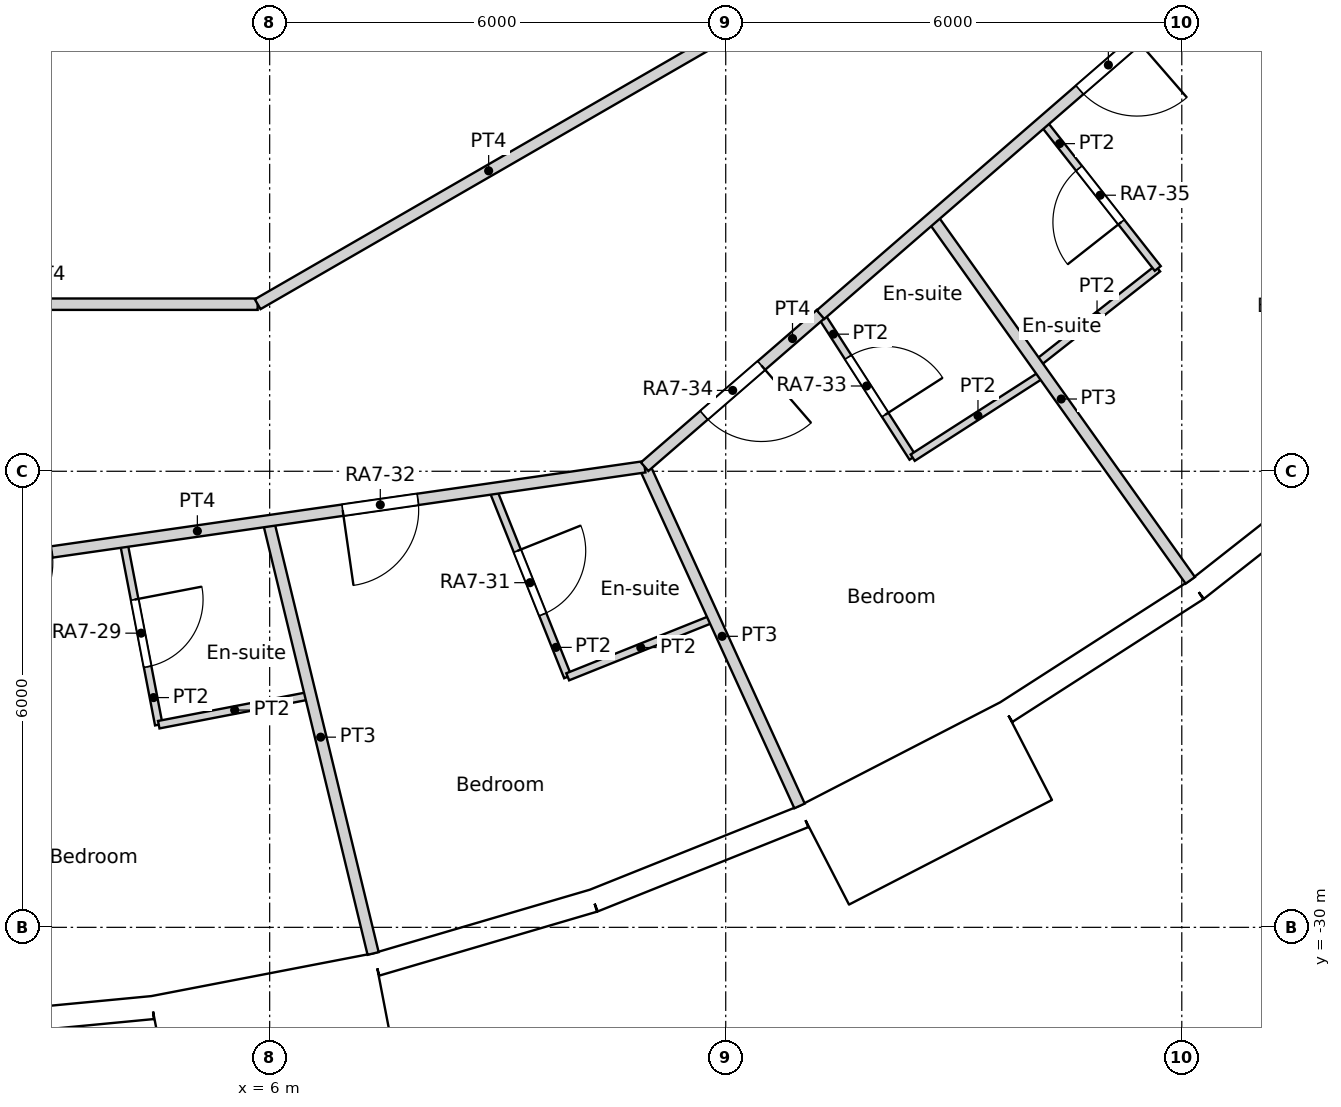
"""IFC4 building model, lengths in metres.
Left out: names, types, materials, properties, quantities, classifications, styles, units other than length and angle.
Written with IfcOpenShell. Run it as: python <this file> out.ifc"""

import sys

from ifc_helpers import new_model, si_unit, direction, frame, frame_2d, origin, origin_2d, place, context, subcontext, project, spatial, rectangle, circle, extrude, element, fill, save


model = new_model("IFC4")
c1 = context("Model", 3, precision=1e-05, world=origin(), true_north=direction((0.0, 1.0)))
c2 = subcontext(c1, "Body", "Model", "MODEL_VIEW")
j1 = project(units=[si_unit("LENGTHUNIT", "METRE"), si_unit("PLANEANGLEUNIT", "RADIAN")], contexts=[c1])
p1 = place(None, origin())
s1 = spatial("IfcSite", under=j1, at=p1, CompositionType="ELEMENT")
p2 = place(p1, origin())
s2 = spatial("IfcBuilding", under=s1, at=p2, CompositionType="ELEMENT")
p3 = place(p2, frame((0.0, 0.0, 93.0)))
s3 = spatial("IfcBuildingStorey", under=s2, at=p3, CompositionType="ELEMENT", Elevation=93.0)
for number, where, z_axis, x_axis in (
    (1, (7.137, -29.421, 0.0), (0.0, 0.0, 1.0), (1.0, 0.0, 0.0)),
    (2, (12.576, -27.539, 0.0), (0.0, 0.0, 1.0), (1.0, 0.0, 0.0)),
    (3, (17.561, -24.661, 0.0), (0.0, 0.0, 1.0), (1.0, 0.0, 0.0)),
):
    element("IfcColumn", number, at=place(p3, frame(where, z_axis=z_axis, x_axis=x_axis)), inside=s3, PredefinedType="COLUMN", context=c2, shape_type="SweptSolid", body=[
        extrude(circle(Radius=0.6, at=origin_2d()), origin(), (0.0, 0.0, 1.0), 3.6),
    ])
for number, where, z_axis, x_axis in (
    (4, (4.263, -24.175, 0.0), (0.0, 0.0, 1.0), (1.0, 0.0, 0.0)),
    (5, (9.723, -22.54, 0.0), (0.0, 0.0, 1.0), (1.0, 0.0, 0.0)),
    (6, (14.659, -19.69, 0.0), (0.0, 0.0, 1.0), (1.0, 0.0, 0.0)),
):
    element("IfcColumn", number, at=place(p3, frame(where, z_axis=z_axis, x_axis=x_axis)), inside=s3, PredefinedType="COLUMN", context=c2, shape_type="SweptSolid", body=[
        extrude(circle(Radius=0.65, at=origin_2d()), origin(), (0.0, 0.0, 1.0), 3.6),
    ])
p4 = place(p3, frame((1.493, -31.339, 0.0), z_axis=(0.0, 0.0, 1.0), x_axis=(0.995472611385, 0.095048829468, 0.0)))
e7 = element("IfcWall", 7, at=p4, inside=s3, PredefinedType="SOLIDWALL", context=c2, shape_type="SweptSolid", body=[
    extrude(rectangle(XDim=2.979, YDim=0.3, at=frame_2d((1.49, 0.0))), origin(), (0.0, 0.0, 1.0), 3.15),
])
p5 = place(p4, frame((1.49, 0.0, 1.55)))
e8 = element("IfcOpeningElement", 8, at=p5, cuts=e7, PredefinedType="OPENING", context=c2, shape_type="SweptSolid", body=[
    extrude(circle(Radius=0.9, at=origin_2d()), frame((0.0, 0.16, 0.0), z_axis=(0.0, -1.0, 0.0), x_axis=(1.0, 0.0, 0.0)), (0.0, 0.0, 1.0), 0.32),
])
p6 = place(p3, frame((4.567, -31.621, -0.45), z_axis=(0.0, 0.0, 1.0), x_axis=(0.981921602273, 0.189288052949, 0.0)))
e9 = element("IfcWall", 9, at=p6, inside=s3, PredefinedType="ELEMENTEDWALL", context=c2, shape_type="SweptSolid", body=[
    extrude(rectangle(XDim=3.0, YDim=1.45, at=frame_2d((1.5, 0.0))), origin(), (0.0, 0.0, 1.0), 3.6),
])
p7 = place(p6, frame((1.5, 0.0, 2.0)))
e10 = element("IfcOpeningElement", 10, at=p7, cuts=e9, PredefinedType="OPENING", context=c2, shape_type="SweptSolid", body=[
    extrude(circle(Radius=0.9, at=origin_2d()), frame((0.0, 0.735, 0.0), z_axis=(0.0, -1.0, 0.0), x_axis=(1.0, 0.0, 0.0)), (0.0, 0.0, 1.0), 1.47),
])
p8 = place(p3, frame((7.403, -30.488, 0.0), z_axis=(0.0, 0.0, 1.0), x_axis=(0.959501085144, 0.281704930036, 0.0)))
e11 = element("IfcWall", 11, at=p8, inside=s3, PredefinedType="SOLIDWALL", context=c2, shape_type="SweptSolid", body=[
    extrude(rectangle(XDim=2.979, YDim=0.3, at=frame_2d((1.49, 0.0))), origin(), (0.0, 0.0, 1.0), 3.15),
])
p9 = place(p8, frame((1.49, 0.0, 1.55)))
e12 = element("IfcOpeningElement", 12, at=p9, cuts=e11, PredefinedType="OPENING", context=c2, shape_type="SweptSolid", body=[
    extrude(circle(Radius=0.9, at=origin_2d()), frame((0.0, 0.16, 0.0), z_axis=(0.0, -1.0, 0.0), x_axis=(1.0, 0.0, 0.0)), (0.0, 0.0, 1.0), 0.32),
])
p10 = place(p3, frame((10.261, -29.649, 0.0), z_axis=(0.0, 0.0, 1.0), x_axis=(0.928374947, 0.371644935098, 0.0)))
e13 = element("IfcWall", 13, at=p10, inside=s3, PredefinedType="SOLIDWALL", context=c2, shape_type="SweptSolid", body=[
    extrude(rectangle(XDim=2.98, YDim=0.3, at=frame_2d((1.49, 0.0))), origin(), (0.0, 0.0, 1.0), 3.15),
])
p11 = place(p10, frame((1.49, 0.0, 1.55)))
e14 = element("IfcOpeningElement", 14, at=p11, cuts=e13, PredefinedType="OPENING", context=c2, shape_type="SweptSolid", body=[
    extrude(circle(Radius=0.9, at=origin_2d()), frame((0.0, 0.16, 0.0), z_axis=(0.0, -1.0, 0.0), x_axis=(1.0, 0.0, 0.0)), (0.0, 0.0, 1.0), 0.32),
])
p12 = place(p3, frame((13.291, -29.053, -0.45), z_axis=(0.0, 0.0, 1.0), x_axis=(0.888858064689, 0.458182650083, 0.0)))
e15 = element("IfcWall", 15, at=p12, inside=s3, PredefinedType="ELEMENTEDWALL", context=c2, shape_type="SweptSolid", body=[
    extrude(rectangle(XDim=3.0, YDim=1.45, at=frame_2d((1.5, 0.0))), origin(), (0.0, 0.0, 1.0), 3.6),
])
p13 = place(p12, frame((1.5, 0.0, 2.0)))
e16 = element("IfcOpeningElement", 16, at=p13, cuts=e15, PredefinedType="OPENING", context=c2, shape_type="SweptSolid", body=[
    extrude(circle(Radius=0.9, at=origin_2d()), frame((0.0, 0.735, 0.0), z_axis=(0.0, -1.0, 0.0), x_axis=(1.0, 0.0, 0.0)), (0.0, 0.0, 1.0), 1.47),
])
p14 = place(p3, frame((15.692, -27.168, 0.0), z_axis=(0.0, 0.0, 1.0), x_axis=(0.841260995538, 0.54062920508, 0.0)))
e17 = element("IfcWall", 17, at=p14, inside=s3, PredefinedType="SOLIDWALL", context=c2, shape_type="SweptSolid", body=[
    extrude(rectangle(XDim=2.979, YDim=0.3, at=frame_2d((1.49, 0.0))), origin(), (0.0, 0.0, 1.0), 3.15),
])
p15 = place(p14, frame((1.49, 0.0, 1.55)))
e18 = element("IfcOpeningElement", 18, at=p15, cuts=e17, PredefinedType="OPENING", context=c2, shape_type="SweptSolid", body=[
    extrude(circle(Radius=0.9, at=origin_2d()), frame((0.0, 0.16, 0.0), z_axis=(0.0, -1.0, 0.0), x_axis=(1.0, 0.0, 0.0)), (0.0, 0.0, 1.0), 0.32),
])
p16 = place(p3, frame((18.199, -25.557, 0.0), z_axis=(0.0, 0.0, 1.0), x_axis=(0.786053834673, 0.618158045322, 0.0)))
e19 = element("IfcWall", 19, at=p16, inside=s3, PredefinedType="SOLIDWALL", context=c2, shape_type="SweptSolid", body=[
    extrude(rectangle(XDim=2.979, YDim=0.3, at=frame_2d((1.49, 0.0))), origin(), (0.0, 0.0, 1.0), 3.15),
])
p17 = place(p16, frame((1.49, 0.0, 1.55)))
e20 = element("IfcOpeningElement", 20, at=p17, cuts=e19, PredefinedType="OPENING", context=c2, shape_type="SweptSolid", body=[
    extrude(circle(Radius=0.9, at=origin_2d()), frame((0.0, 0.16, 0.0), z_axis=(0.0, -1.0, 0.0), x_axis=(1.0, 0.0, 0.0)), (0.0, 0.0, 1.0), 0.32),
])
p18 = place(p3, frame((13.247, -21.939, 0.0), z_axis=(0.0, 0.0, 1.0), x_axis=(0.755420750547, 0.655240024451, 0.0)))
e21 = element("IfcWall", 21, at=p18, inside=s3, PredefinedType="PARTITIONING", context=c2, shape_type="SweptSolid", body=[
    extrude(rectangle(XDim=11.771, YDim=0.15, at=frame_2d((5.885, 0.0))), origin(), (0.0, 0.0, 1.0), 3.15),
])
p19 = place(p18, frame((4.513, 0.0, 0.0)))
e22 = element("IfcOpeningElement", 22, at=p19, cuts=e21, PredefinedType="OPENING", context=c2, shape_type="SweptSolid", body=[
    extrude(rectangle(XDim=1.0, YDim=2.1, at=frame_2d((0.5, 1.05))), frame((0.0, 0.075, 0.0), z_axis=(0.0, -1.0, 0.0), x_axis=(1.0, 0.0, 0.0)), (0.0, 0.0, 1.0), 0.15),
])
p20 = place(p3, frame((0.31, -21.802, 0.0), z_axis=(0.0, 0.0, 1.0), x_axis=(1.0, 0.0, 0.0)))
e23 = element("IfcWall", 23, at=p20, inside=s3, PredefinedType="PARTITIONING", context=c2, shape_type="SweptSolid", body=[
    extrude(rectangle(XDim=5.532, YDim=0.15, at=frame_2d((2.766, 0.0))), origin(), (0.0, 0.0, 1.0), 3.15),
])
p21 = place(p3, frame((5.842, -21.802, 0.0), z_axis=(0.0, 0.0, 1.0), x_axis=(0.866027436592, 0.499996479058, 0.0)))
e24 = element("IfcWall", 24, at=p21, inside=s3, PredefinedType="PARTITIONING", context=c2, shape_type="SweptSolid", body=[
    extrude(rectangle(XDim=7.018, YDim=0.15, at=frame_2d((3.509, 0.0))), origin(), (0.0, 0.0, 1.0), 3.15),
])
p22 = place(p3, frame((-3.746, -26.05, 0.0), z_axis=(0.0, 0.0, 1.0), x_axis=(0.98983491963, 0.142221066938, 0.0)))
e25 = element("IfcWall", 25, at=p22, inside=s3, PredefinedType="PARTITIONING", context=c2, shape_type="SweptSolid", body=[
    extrude(rectangle(XDim=14.83, YDim=0.15, at=frame_2d((7.415, 0.0))), origin(), (0.0, 0.0, 1.0), 3.15),
])
p23 = place(p22, frame((3.214, 0.0, 0.0)))
e26 = element("IfcOpeningElement", 26, at=p23, cuts=e25, PredefinedType="OPENING", context=c2, shape_type="SweptSolid", body=[
    extrude(rectangle(XDim=1.0, YDim=2.1, at=frame_2d((0.5, 1.05))), frame((0.0, 0.075, 0.0), z_axis=(0.0, -1.0, 0.0), x_axis=(1.0, 0.0, 0.0)), (0.0, 0.0, 1.0), 0.15),
])
p24 = place(p22, frame((5.954, 0.0, 0.0)))
e27 = element("IfcOpeningElement", 27, at=p24, cuts=e25, PredefinedType="OPENING", context=c2, shape_type="SweptSolid", body=[
    extrude(rectangle(XDim=1.0, YDim=2.1, at=frame_2d((0.5, 1.05))), frame((0.0, 0.075, 0.0), z_axis=(0.0, -1.0, 0.0), x_axis=(1.0, 0.0, 0.0)), (0.0, 0.0, 1.0), 0.15),
])
p25 = place(p22, frame((10.816, 0.0, 0.0)))
e28 = element("IfcOpeningElement", 28, at=p25, cuts=e25, PredefinedType="OPENING", context=c2, shape_type="SweptSolid", body=[
    extrude(rectangle(XDim=1.0, YDim=2.1, at=frame_2d((0.5, 1.05))), frame((0.0, 0.075, 0.0), z_axis=(0.0, -1.0, 0.0), x_axis=(1.0, 0.0, 0.0)), (0.0, 0.0, 1.0), 0.15),
])
p26 = place(p3, frame((10.933, -23.94, 0.0), z_axis=(0.0, 0.0, 1.0), x_axis=(0.755675945931, 0.654945696025, 0.0)))
e29 = element("IfcWall", 29, at=p26, inside=s3, PredefinedType="PARTITIONING", context=c2, shape_type="SweptSolid", body=[
    extrude(rectangle(XDim=3.066, YDim=0.15, at=frame_2d((1.533, 0.0))), origin(), (0.0, 0.0, 1.0), 3.15),
])
p27 = place(p26, frame((1.033, 0.0, 0.0)))
e30 = element("IfcOpeningElement", 30, at=p27, cuts=e29, PredefinedType="OPENING", context=c2, shape_type="SweptSolid", body=[
    extrude(rectangle(XDim=1.0, YDim=2.1, at=frame_2d((0.5, 1.05))), frame((0.0, 0.075, 0.0), z_axis=(0.0, -1.0, 0.0), x_axis=(1.0, 0.0, 0.0)), (0.0, 0.0, 1.0), 0.15),
])
p28 = place(p3, frame((4.077, -24.926, 0.0), z_axis=(0.0, 0.0, 1.0), x_axis=(0.18925724964, -0.981927539821, 0.0)))
e31 = element("IfcWall", 31, at=p28, inside=s3, PredefinedType="PARTITIONING", context=c2, shape_type="SweptSolid", body=[
    extrude(rectangle(XDim=2.452, YDim=0.1, at=frame_2d((1.226, 0.0))), origin(), (0.0, 0.0, 1.0), 3.15),
])
p29 = place(p28, frame((0.776, 0.0, 0.0)))
e32 = element("IfcOpeningElement", 32, at=p29, cuts=e31, PredefinedType="OPENING", context=c2, shape_type="SweptSolid", body=[
    extrude(rectangle(XDim=0.9, YDim=2.04, at=frame_2d((0.45, 1.02))), frame((0.0, 0.05, 0.0), z_axis=(0.0, -1.0, 0.0), x_axis=(1.0, 0.0, 0.0)), (0.0, 0.0, 1.0), 0.1),
])
p30 = place(p3, frame((4.541, -27.334, 0.0), z_axis=(0.0, 0.0, 1.0), x_axis=(0.981919009751, 0.189301501024, 0.0)))
e33 = element("IfcWall", 33, at=p30, inside=s3, PredefinedType="PARTITIONING", context=c2, shape_type="SweptSolid", body=[
    extrude(rectangle(XDim=2.034, YDim=0.1, at=frame_2d((1.017, 0.0))), origin(), (0.0, 0.0, 1.0), 3.15),
])
p31 = place(p3, frame((5.981, -24.652, 0.0), z_axis=(0.0, 0.0, 1.0), x_axis=(0.235604797906, -0.971848948759, 0.0)))
e34 = element("IfcWall", 34, at=p31, inside=s3, PredefinedType="PARTITIONING", context=c2, shape_type="SweptSolid", body=[
    extrude(rectangle(XDim=5.857, YDim=0.15, at=frame_2d((2.928, 0.0))), origin(), (0.0, 0.0, 1.0), 3.15),
])
p32 = place(p3, frame((8.93, -24.228, 0.0), z_axis=(0.0, 0.0, 1.0), x_axis=(0.371564281805, -0.928407229876, 0.0)))
e35 = element("IfcWall", 35, at=p32, inside=s3, PredefinedType="PARTITIONING", context=c2, shape_type="SweptSolid", body=[
    extrude(rectangle(XDim=2.667, YDim=0.1, at=frame_2d((1.333, 0.0))), origin(), (0.0, 0.0, 1.0), 3.15),
])
p33 = place(p32, frame((0.883, 0.0, 0.0)))
e36 = element("IfcOpeningElement", 36, at=p33, cuts=e35, PredefinedType="OPENING", context=c2, shape_type="SweptSolid", body=[
    extrude(rectangle(XDim=0.9, YDim=2.04, at=frame_2d((0.45, 1.02))), frame((0.0, 0.05, 0.0), z_axis=(0.0, -1.0, 0.0), x_axis=(1.0, 0.0, 0.0)), (0.0, 0.0, 1.0), 0.1),
])
p34 = place(p3, frame((9.921, -26.704, 0.0), z_axis=(0.0, 0.0, 1.0), x_axis=(0.928346586681, 0.37171577179, 0.0)))
e37 = element("IfcWall", 37, at=p34, inside=s3, PredefinedType="PARTITIONING", context=c2, shape_type="SweptSolid", body=[
    extrude(rectangle(XDim=2.072, YDim=0.1, at=frame_2d((1.036, 0.0))), origin(), (0.0, 0.0, 1.0), 3.15),
])
p35 = place(p3, frame((10.934, -23.94, 0.0), z_axis=(0.0, 0.0, 1.0), x_axis=(0.415245800153, -0.909709253254, 0.0)))
e38 = element("IfcWall", 38, at=p35, inside=s3, PredefinedType="PARTITIONING", context=c2, shape_type="SweptSolid", body=[
    extrude(rectangle(XDim=4.906, YDim=0.15, at=frame_2d((2.453, 0.0))), origin(), (0.0, 0.0, 1.0), 3.15),
])
p36 = place(p3, frame((13.248, -21.935, 0.0), z_axis=(0.0, 0.0, 1.0), x_axis=(0.540597960994, -0.841281073464, 0.0)))
e39 = element("IfcWall", 39, at=p36, inside=s3, PredefinedType="PARTITIONING", context=c2, shape_type="SweptSolid", body=[
    extrude(rectangle(XDim=2.242, YDim=0.1, at=frame_2d((1.121, 0.0))), origin(), (0.0, 0.0, 1.0), 3.15),
])
p37 = place(p36, frame((0.671, 0.0, 0.0)))
e40 = element("IfcOpeningElement", 40, at=p37, cuts=e39, PredefinedType="OPENING", context=c2, shape_type="SweptSolid", body=[
    extrude(rectangle(XDim=0.9, YDim=2.04, at=frame_2d((0.45, 1.02))), frame((0.0, 0.05, 0.0), z_axis=(0.0, -1.0, 0.0), x_axis=(1.0, 0.0, 0.0)), (0.0, 0.0, 1.0), 0.1),
])
p38 = place(p3, frame((14.46, -23.821, 0.0), z_axis=(0.0, 0.0, 1.0), x_axis=(0.841135728185, 0.540824081168, 0.0)))
e41 = element("IfcWall", 41, at=p38, inside=s3, PredefinedType="PARTITIONING", context=c2, shape_type="SweptSolid", body=[
    extrude(rectangle(XDim=2.041, YDim=0.1, at=frame_2d((1.021, 0.0))), origin(), (0.0, 0.0, 1.0), 3.15),
])
p39 = place(p3, frame((14.715, -20.664, 0.0), z_axis=(0.0, 0.0, 1.0), x_axis=(0.57995989616, -0.814645026282, 0.0)))
e42 = element("IfcWall", 42, at=p39, inside=s3, PredefinedType="PARTITIONING", context=c2, shape_type="SweptSolid", body=[
    extrude(rectangle(XDim=5.857, YDim=0.15, at=frame_2d((2.928, 0.0))), origin(), (0.0, 0.0, 1.0), 3.15),
])
p40 = place(p3, frame((16.086, -22.589, 0.0), z_axis=(0.0, 0.0, 1.0), x_axis=(0.785984904201, 0.618245687707, 0.0)))
e43 = element("IfcWall", 43, at=p40, inside=s3, PredefinedType="PARTITIONING", context=c2, shape_type="SweptSolid", body=[
    extrude(rectangle(XDim=2.033, YDim=0.1, at=frame_2d((1.017, 0.0))), origin(), (0.0, 0.0, 1.0), 3.15),
])
p41 = place(p3, frame((16.168, -19.404, 0.0), z_axis=(0.0, 0.0, 1.0), x_axis=(0.618142414415, -0.786066126672, 0.0)))
e44 = element("IfcWall", 44, at=p41, inside=s3, PredefinedType="PARTITIONING", context=c2, shape_type="SweptSolid", body=[
    extrude(rectangle(XDim=2.453, YDim=0.1, at=frame_2d((1.226, 0.0))), origin(), (0.0, 0.0, 1.0), 3.15),
])
p42 = place(p41, frame((0.777, 0.0, 0.0)))
e45 = element("IfcOpeningElement", 45, at=p42, cuts=e44, PredefinedType="OPENING", context=c2, shape_type="SweptSolid", body=[
    extrude(rectangle(XDim=0.9, YDim=2.04, at=frame_2d((0.45, 1.02))), frame((0.0, 0.05, 0.0), z_axis=(0.0, -1.0, 0.0), x_axis=(1.0, 0.0, 0.0)), (0.0, 0.0, 1.0), 0.1),
])
p43 = place(p3, frame((18.359, -17.506, 0.0), z_axis=(0.0, 0.0, 1.0), x_axis=(0.723808715798, -0.690000683286, 0.0)))
e46 = element("IfcWall", 46, at=p43, inside=s3, PredefinedType="PARTITIONING", context=c2, shape_type="SweptSolid", body=[
    extrude(rectangle(XDim=5.856, YDim=0.15, at=frame_2d((2.928, 0.0))), origin(), (0.0, 0.0, 1.0), 3.15),
])
p44 = place(p5, origin())
e47 = element("IfcWindow", 47, at=p44, inside=s3, PartitioningType="SINGLE_PANEL", PredefinedType="WINDOW", context=c2, shape_type="SweptSolid", body=[
    extrude(circle(Radius=0.9, at=origin_2d()), frame((0.0, 0.12, 0.0), z_axis=(0.0, -1.0, 0.0), x_axis=(1.0, 0.0, 0.0)), (0.0, 0.0, 1.0), 0.1),
])
fill(e8, e47)
p45 = place(p7, origin())
e48 = element("IfcWindow", 48, at=p45, inside=s3, PartitioningType="SINGLE_PANEL", PredefinedType="WINDOW", context=c2, shape_type="SweptSolid", body=[
    extrude(circle(Radius=0.9, at=origin_2d()), frame((0.0, 0.695, 0.0), z_axis=(0.0, -1.0, 0.0), x_axis=(1.0, 0.0, 0.0)), (0.0, 0.0, 1.0), 0.1),
])
fill(e10, e48)
p46 = place(p9, origin())
e49 = element("IfcWindow", 49, at=p46, inside=s3, PartitioningType="SINGLE_PANEL", PredefinedType="WINDOW", context=c2, shape_type="SweptSolid", body=[
    extrude(circle(Radius=0.9, at=origin_2d()), frame((0.0, 0.12, 0.0), z_axis=(0.0, -1.0, 0.0), x_axis=(1.0, 0.0, 0.0)), (0.0, 0.0, 1.0), 0.1),
])
fill(e12, e49)
p47 = place(p11, origin())
e50 = element("IfcWindow", 50, at=p47, inside=s3, PartitioningType="SINGLE_PANEL", PredefinedType="WINDOW", context=c2, shape_type="SweptSolid", body=[
    extrude(circle(Radius=0.9, at=origin_2d()), frame((0.0, 0.12, 0.0), z_axis=(0.0, -1.0, 0.0), x_axis=(1.0, 0.0, 0.0)), (0.0, 0.0, 1.0), 0.1),
])
fill(e14, e50)
p48 = place(p13, origin())
e51 = element("IfcWindow", 51, at=p48, inside=s3, PartitioningType="SINGLE_PANEL", PredefinedType="WINDOW", context=c2, shape_type="SweptSolid", body=[
    extrude(circle(Radius=0.9, at=origin_2d()), frame((0.0, 0.695, 0.0), z_axis=(0.0, -1.0, 0.0), x_axis=(1.0, 0.0, 0.0)), (0.0, 0.0, 1.0), 0.1),
])
fill(e16, e51)
p49 = place(p15, origin())
e52 = element("IfcWindow", 52, at=p49, inside=s3, PartitioningType="SINGLE_PANEL", PredefinedType="WINDOW", context=c2, shape_type="SweptSolid", body=[
    extrude(circle(Radius=0.9, at=origin_2d()), frame((0.0, 0.12, 0.0), z_axis=(0.0, -1.0, 0.0), x_axis=(1.0, 0.0, 0.0)), (0.0, 0.0, 1.0), 0.1),
])
fill(e18, e52)
p50 = place(p17, origin())
e53 = element("IfcWindow", 53, at=p50, inside=s3, PartitioningType="SINGLE_PANEL", PredefinedType="WINDOW", context=c2, shape_type="SweptSolid", body=[
    extrude(circle(Radius=0.9, at=origin_2d()), frame((0.0, 0.12, 0.0), z_axis=(0.0, -1.0, 0.0), x_axis=(1.0, 0.0, 0.0)), (0.0, 0.0, 1.0), 0.1),
])
fill(e20, e53)
p51 = place(p29, origin())
e54 = element("IfcDoor", 54, at=p51, inside=s3, OperationType="SINGLE_SWING_LEFT", PredefinedType="DOOR", context=c2, shape_type="SweptSolid", body=[
    extrude(rectangle(XDim=0.9, YDim=2.04, at=frame_2d((0.45, 1.02))), frame((0.0, 0.025, 0.0), z_axis=(0.0, -1.0, 0.0), x_axis=(1.0, 0.0, 0.0)), (0.0, 0.0, 1.0), 0.05),
])
fill(e32, e54)
p52 = place(p33, origin())
e55 = element("IfcDoor", 55, at=p52, inside=s3, OperationType="SINGLE_SWING_LEFT", PredefinedType="DOOR", context=c2, shape_type="SweptSolid", body=[
    extrude(rectangle(XDim=0.9, YDim=2.04, at=frame_2d((0.45, 1.02))), frame((0.0, 0.025, 0.0), z_axis=(0.0, -1.0, 0.0), x_axis=(1.0, 0.0, 0.0)), (0.0, 0.0, 1.0), 0.05),
])
fill(e36, e55)
p53 = place(p25, origin())
e56 = element("IfcDoor", 56, at=p53, inside=s3, OperationType="SINGLE_SWING_RIGHT", PredefinedType="DOOR", context=c2, shape_type="SweptSolid", body=[
    extrude(rectangle(XDim=1.0, YDim=2.1, at=frame_2d((0.5, 1.05))), frame((0.0, 0.025, 0.0), z_axis=(0.0, -1.0, 0.0), x_axis=(1.0, 0.0, 0.0)), (0.0, 0.0, 1.0), 0.05),
])
fill(e28, e56)
p54 = place(p37, origin())
e57 = element("IfcDoor", 57, at=p54, inside=s3, OperationType="SINGLE_SWING_RIGHT", PredefinedType="DOOR", context=c2, shape_type="SweptSolid", body=[
    extrude(rectangle(XDim=0.9, YDim=2.04, at=frame_2d((0.45, 1.02))), frame((0.0, 0.025, 0.0), z_axis=(0.0, -1.0, 0.0), x_axis=(1.0, 0.0, 0.0)), (0.0, 0.0, 1.0), 0.05),
])
fill(e40, e57)
p55 = place(p27, origin())
e58 = element("IfcDoor", 58, at=p55, inside=s3, OperationType="SINGLE_SWING_LEFT", PredefinedType="DOOR", context=c2, shape_type="SweptSolid", body=[
    extrude(rectangle(XDim=1.0, YDim=2.1, at=frame_2d((0.5, 1.05))), frame((0.0, 0.025, 0.0), z_axis=(0.0, -1.0, 0.0), x_axis=(1.0, 0.0, 0.0)), (0.0, 0.0, 1.0), 0.05),
])
fill(e30, e58)
p56 = place(p42, origin())
e59 = element("IfcDoor", 59, at=p56, inside=s3, OperationType="SINGLE_SWING_LEFT", PredefinedType="DOOR", context=c2, shape_type="SweptSolid", body=[
    extrude(rectangle(XDim=0.9, YDim=2.04, at=frame_2d((0.45, 1.02))), frame((0.0, 0.025, 0.0), z_axis=(0.0, -1.0, 0.0), x_axis=(1.0, 0.0, 0.0)), (0.0, 0.0, 1.0), 0.05),
])
fill(e45, e59)
p57 = place(p19, origin())
e60 = element("IfcDoor", 60, at=p57, inside=s3, OperationType="SINGLE_SWING_LEFT", PredefinedType="DOOR", context=c2, shape_type="SweptSolid", body=[
    extrude(rectangle(XDim=1.0, YDim=2.1, at=frame_2d((0.5, 1.05))), frame((0.0, 0.025, 0.0), z_axis=(0.0, -1.0, 0.0), x_axis=(1.0, 0.0, 0.0)), (0.0, 0.0, 1.0), 0.05),
])
fill(e22, e60)
save(model, sys.argv[1])
